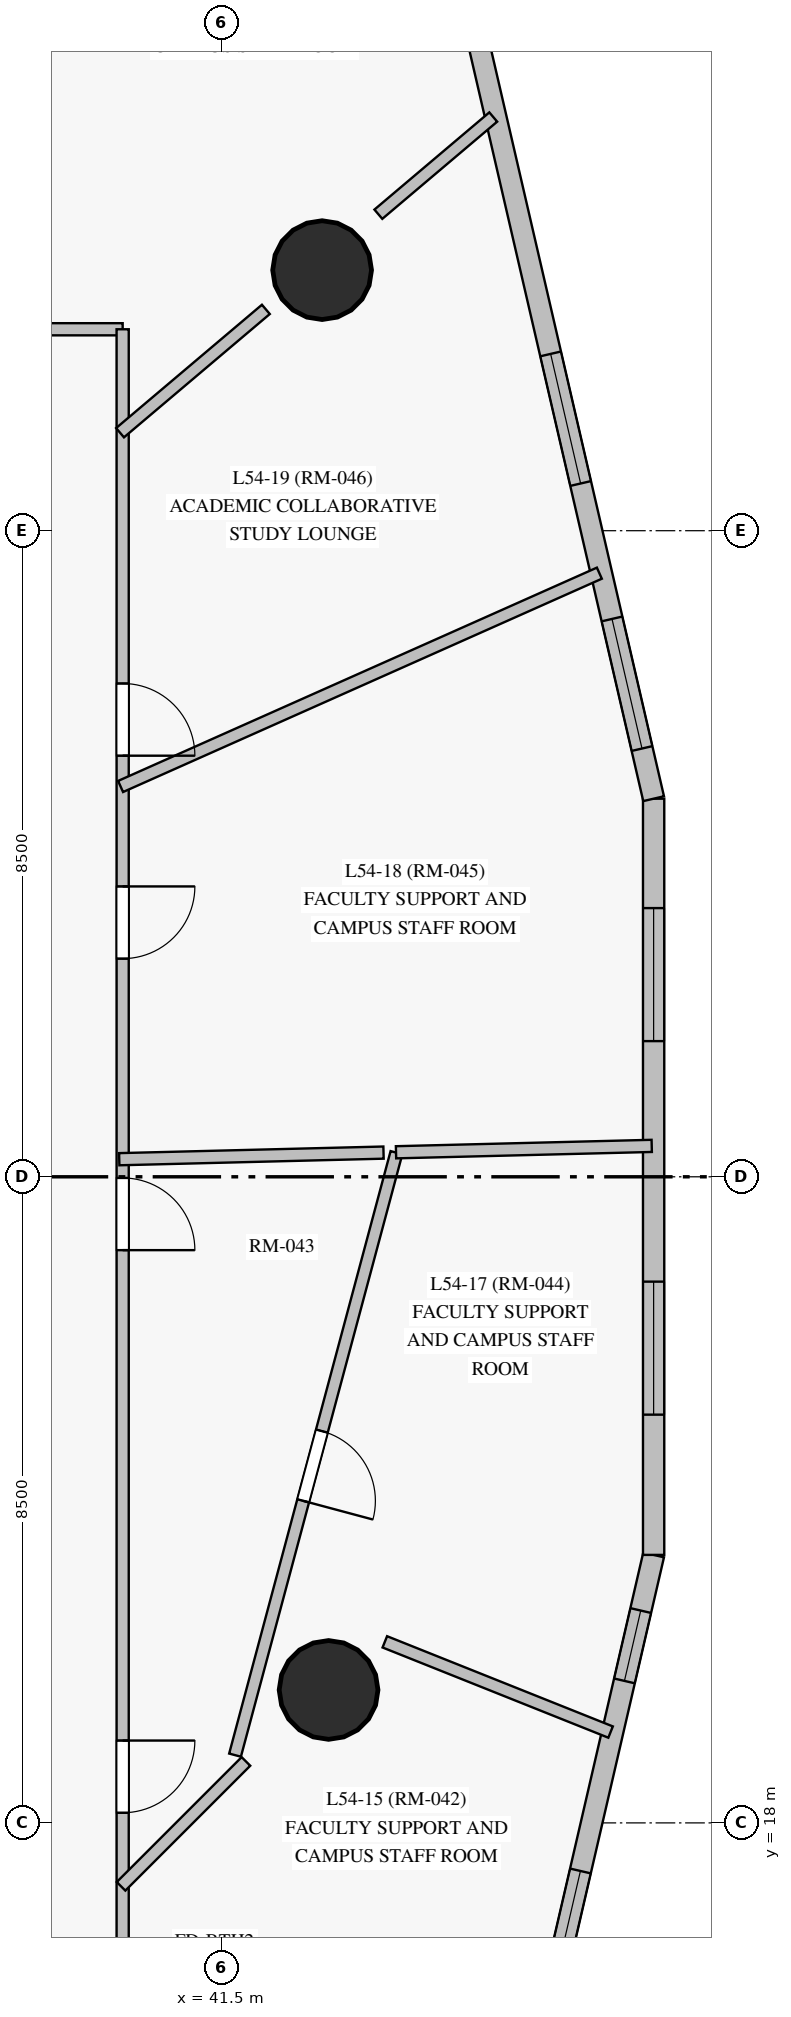
"""IFC4 building model, lengths in metres.
Left out: names, types, materials, properties, quantities, classifications, styles, units other than length and angle.
Written with IfcOpenShell. Run it as: python <this file> out.ifc"""

import sys

from ifc_helpers import new_model, si_unit, direction, frame, frame_2d, origin, origin_with_axes, origin_2d, place, context, subcontext, project, spatial, rectangle, circle, extrude, source, transform, mapped, element, fill, save


model = new_model("IFC4")
c1 = context("Model", 3, precision=1e-05, world=origin(), true_north=direction((0.0, 1.0)))
c2 = subcontext(c1, "Body", "Model", "MODEL_VIEW")
j1 = project(units=[si_unit("LENGTHUNIT", "METRE"), si_unit("PLANEANGLEUNIT", "RADIAN")], contexts=[c1])
p1 = place(None, origin())
s1 = spatial("IfcSite", under=j1, at=p1, CompositionType="ELEMENT")
p2 = place(p1, origin())
s2 = spatial("IfcBuilding", under=s1, at=p2, CompositionType="ELEMENT")
p3 = place(p2, frame((0.0, 0.0, 187.05)))
s3 = spatial("IfcBuildingStorey", under=s2, at=p3, CompositionType="ELEMENT", Elevation=187.05)
m1 = source(origin_with_axes(), c2, "Body", "SweptSolid", [
    extrude(circle(Radius=0.65, at=origin_2d()), origin(), (0.0, 0.0, 1.0), 3.05),
])
for number, where, z_axis, x_axis in (
    (1, (42.909, 19.749, 0.0), (0.0, 0.0, 1.0), (1.0, 0.0, 0.0)),
    (2, (42.824, 38.428, 0.0), (0.0, 0.0, 1.0), (1.0, 0.0, 0.0)),
):
    element("IfcColumn", number, at=place(p3, frame(where, z_axis=z_axis, x_axis=x_axis)), inside=s3, PredefinedType="COLUMN", context=c2, shape_type="MappedRepresentation", body=[
        mapped(m1, transform((0.0, 0.0, 0.0), scale=1.0)),
    ])
p4 = place(p3, frame((43.942, 7.521, 0.0), z_axis=(0.0, 0.0, 1.0), x_axis=(0.225598723883, 0.974220311727, 0.0)))
e3 = element("IfcWall", 3, at=p4, inside=s3, PredefinedType="SOLIDWALL", context=c2, shape_type="SweptSolid", body=[
    extrude(rectangle(XDim=14.375, YDim=0.28, at=frame_2d((7.188, 0.0))), origin(), (0.0, 0.0, 1.0), 2.825),
])
p5 = place(p4, frame((3.496, 0.0, 0.85)))
e4 = element("IfcOpeningElement", 4, at=p5, cuts=e3, PredefinedType="OPENING", context=c2, shape_type="SweptSolid", body=[
    extrude(rectangle(XDim=1.75, YDim=1.65, at=frame_2d((0.875, 0.825))), frame((0.0, 0.15, 0.0), z_axis=(0.0, -1.0, 0.0), x_axis=(1.0, 0.0, 0.0)), (0.0, 0.0, 1.0), 0.3),
])
p6 = place(p4, frame((8.356, 0.0, 0.85)))
e5 = element("IfcOpeningElement", 5, at=p6, cuts=e3, PredefinedType="OPENING", context=c2, shape_type="SweptSolid", body=[
    extrude(rectangle(XDim=1.75, YDim=1.65, at=frame_2d((0.875, 0.825))), frame((0.0, 0.15, 0.0), z_axis=(0.0, -1.0, 0.0), x_axis=(1.0, 0.0, 0.0)), (0.0, 0.0, 1.0), 0.3),
])
p7 = place(p4, frame((12.673, 0.0, 0.85)))
e6 = element("IfcOpeningElement", 6, at=p7, cuts=e3, PredefinedType="OPENING", context=c2, shape_type="SweptSolid", body=[
    extrude(rectangle(XDim=0.95, YDim=1.5, at=frame_2d((0.475, 0.75))), frame((0.0, 0.15, 0.0), z_axis=(0.0, -1.0, 0.0), x_axis=(1.0, 0.0, 0.0)), (0.0, 0.0, 1.0), 0.3),
])
p8 = place(p3, frame((47.185, 21.526, 0.0), z_axis=(0.0, 0.0, 1.0), x_axis=(0.0, 1.0, 0.0)))
e7 = element("IfcWall", 7, at=p8, inside=s3, PredefinedType="SOLIDWALL", context=c2, shape_type="SweptSolid", body=[
    extrude(rectangle(XDim=9.949, YDim=0.28, at=frame_2d((4.974, 0.0))), origin(), (0.0, 0.0, 1.0), 2.825),
])
p9 = place(p8, frame((1.845, 0.0, 0.85)))
e8 = element("IfcOpeningElement", 8, at=p9, cuts=e7, PredefinedType="OPENING", context=c2, shape_type="SweptSolid", body=[
    extrude(rectangle(XDim=1.75, YDim=1.65, at=frame_2d((0.875, 0.825))), frame((0.0, 0.15, 0.0), z_axis=(0.0, -1.0, 0.0), x_axis=(1.0, 0.0, 0.0)), (0.0, 0.0, 1.0), 0.3),
])
p10 = place(p8, frame((6.759, 0.0, 0.85)))
e9 = element("IfcOpeningElement", 9, at=p10, cuts=e7, PredefinedType="OPENING", context=c2, shape_type="SweptSolid", body=[
    extrude(rectangle(XDim=1.75, YDim=1.65, at=frame_2d((0.875, 0.825))), frame((0.0, 0.15, 0.0), z_axis=(0.0, -1.0, 0.0), x_axis=(1.0, 0.0, 0.0)), (0.0, 0.0, 1.0), 0.3),
])
p11 = place(p3, frame((47.185, 31.474, 0.0), z_axis=(0.0, 0.0, 1.0), x_axis=(-0.225598723883, 0.974220311727, 0.0)))
e10 = element("IfcWall", 10, at=p11, inside=s3, PredefinedType="SOLIDWALL", context=c2, shape_type="SweptSolid", body=[
    extrude(rectangle(XDim=14.375, YDim=0.28, at=frame_2d((7.188, 0.0))), origin(), (0.0, 0.0, 1.0), 2.825),
])
p12 = place(p11, frame((0.677, 0.0, 0.85)))
e11 = element("IfcOpeningElement", 11, at=p12, cuts=e10, PredefinedType="OPENING", context=c2, shape_type="SweptSolid", body=[
    extrude(rectangle(XDim=1.75, YDim=1.65, at=frame_2d((0.875, 0.825))), frame((0.0, 0.15, 0.0), z_axis=(0.0, -1.0, 0.0), x_axis=(1.0, 0.0, 0.0)), (0.0, 0.0, 1.0), 0.3),
])
p13 = place(p11, frame((4.256, 0.0, 0.85)))
e12 = element("IfcOpeningElement", 12, at=p13, cuts=e10, PredefinedType="OPENING", context=c2, shape_type="SweptSolid", body=[
    extrude(rectangle(XDim=1.75, YDim=1.65, at=frame_2d((0.875, 0.825))), frame((0.0, 0.15, 0.0), z_axis=(0.0, -1.0, 0.0), x_axis=(1.0, 0.0, 0.0)), (0.0, 0.0, 1.0), 0.3),
])
p14 = place(p11, frame((11.865, 0.0, 0.85)))
e13 = element("IfcOpeningElement", 13, at=p14, cuts=e10, PredefinedType="OPENING", context=c2, shape_type="SweptSolid", body=[
    extrude(rectangle(XDim=1.75, YDim=1.65, at=frame_2d((0.875, 0.825))), frame((0.0, 0.15, 0.0), z_axis=(0.0, -1.0, 0.0), x_axis=(1.0, 0.0, 0.0)), (0.0, 0.0, 1.0), 0.3),
])
p15 = place(p3, frame((16.7, 37.65, 0.0), z_axis=(0.0, 0.0, 1.0), x_axis=(1.0, 0.0, 0.0)))
e14 = element("IfcWall", 14, at=p15, inside=s3, PredefinedType="PARTITIONING", context=c2, shape_type="SweptSolid", body=[
    extrude(rectangle(XDim=23.5, YDim=0.16, at=frame_2d((11.75, 0.0))), origin(), (0.0, 0.0, 1.0), 2.375),
])
p16 = place(p15, frame((21.043, 0.0, 0.0)))
e15 = element("IfcOpeningElement", 15, at=p16, cuts=e14, PredefinedType="OPENING", context=c2, shape_type="SweptSolid", body=[
    extrude(rectangle(XDim=0.95, YDim=2.15, at=frame_2d((0.475, 1.075))), frame((0.0, 0.09, 0.0), z_axis=(0.0, -1.0, 0.0), x_axis=(1.0, 0.0, 0.0)), (0.0, 0.0, 1.0), 0.18),
])
p17 = place(p15, frame((17.79, 0.0, 0.0)))
e16 = element("IfcOpeningElement", 16, at=p17, cuts=e14, PredefinedType="OPENING", context=c2, shape_type="SweptSolid", body=[
    extrude(rectangle(XDim=0.95, YDim=2.15, at=frame_2d((0.475, 1.075))), frame((0.0, 0.09, 0.0), z_axis=(0.0, -1.0, 0.0), x_axis=(1.0, 0.0, 0.0)), (0.0, 0.0, 1.0), 0.18),
])
p18 = place(p15, frame((15.763, 0.0, 0.0)))
e17 = element("IfcOpeningElement", 17, at=p18, cuts=e14, PredefinedType="OPENING", context=c2, shape_type="SweptSolid", body=[
    extrude(rectangle(XDim=0.95, YDim=2.15, at=frame_2d((0.475, 1.075))), frame((0.0, 0.09, 0.0), z_axis=(0.0, -1.0, 0.0), x_axis=(1.0, 0.0, 0.0)), (0.0, 0.0, 1.0), 0.18),
])
p19 = place(p15, frame((13.003, 0.0, 0.0)))
e18 = element("IfcOpeningElement", 18, at=p19, cuts=e14, PredefinedType="OPENING", context=c2, shape_type="SweptSolid", body=[
    extrude(rectangle(XDim=0.95, YDim=2.15, at=frame_2d((0.475, 1.075))), frame((0.0, 0.09, 0.0), z_axis=(0.0, -1.0, 0.0), x_axis=(1.0, 0.0, 0.0)), (0.0, 0.0, 1.0), 0.18),
])
p20 = place(p15, frame((11.275, 0.0, 0.0)))
e19 = element("IfcOpeningElement", 19, at=p20, cuts=e14, PredefinedType="OPENING", context=c2, shape_type="SweptSolid", body=[
    extrude(rectangle(XDim=0.95, YDim=2.15, at=frame_2d((0.475, 1.075))), frame((0.0, 0.09, 0.0), z_axis=(0.0, -1.0, 0.0), x_axis=(1.0, 0.0, 0.0)), (0.0, 0.0, 1.0), 0.18),
])
p21 = place(p15, frame((7.75, 0.0, 0.0)))
e20 = element("IfcOpeningElement", 20, at=p21, cuts=e14, PredefinedType="OPENING", context=c2, shape_type="SweptSolid", body=[
    extrude(rectangle(XDim=0.95, YDim=2.15, at=frame_2d((0.475, 1.075))), frame((0.0, 0.09, 0.0), z_axis=(0.0, -1.0, 0.0), x_axis=(1.0, 0.0, 0.0)), (0.0, 0.0, 1.0), 0.18),
])
p22 = place(p15, frame((0.493, 0.0, 0.0)))
e21 = element("IfcOpeningElement", 21, at=p22, cuts=e14, PredefinedType="OPENING", context=c2, shape_type="SweptSolid", body=[
    extrude(rectangle(XDim=0.95, YDim=2.15, at=frame_2d((0.475, 1.075))), frame((0.0, 0.09, 0.0), z_axis=(0.0, -1.0, 0.0), x_axis=(1.0, 0.0, 0.0)), (0.0, 0.0, 1.0), 0.18),
])
p23 = place(p3, frame((40.2, 37.65, 0.0), z_axis=(0.0, 0.0, 1.0), x_axis=(0.0, -1.0, 0.0)))
e22 = element("IfcWall", 22, at=p23, inside=s3, PredefinedType="PARTITIONING", context=c2, shape_type="SweptSolid", body=[
    extrude(rectangle(XDim=22.3, YDim=0.16, at=frame_2d((11.15, 0.0))), origin(), (0.0, 0.0, 1.0), 2.375),
])
p24 = place(p23, frame((18.567, 0.0, 0.0)))
e23 = element("IfcOpeningElement", 23, at=p24, cuts=e22, PredefinedType="OPENING", context=c2, shape_type="SweptSolid", body=[
    extrude(rectangle(XDim=0.95, YDim=2.15, at=frame_2d((0.475, 1.075))), frame((0.0, 0.09, 0.0), z_axis=(0.0, -1.0, 0.0), x_axis=(1.0, 0.0, 0.0)), (0.0, 0.0, 1.0), 0.18),
])
p25 = place(p23, frame((11.165, 0.0, 0.0)))
e24 = element("IfcOpeningElement", 24, at=p25, cuts=e22, PredefinedType="OPENING", context=c2, shape_type="SweptSolid", body=[
    extrude(rectangle(XDim=0.95, YDim=2.15, at=frame_2d((0.475, 1.075))), frame((0.0, 0.09, 0.0), z_axis=(0.0, -1.0, 0.0), x_axis=(1.0, 0.0, 0.0)), (0.0, 0.0, 1.0), 0.18),
])
p26 = place(p23, frame((7.33, 0.0, 0.0)))
e25 = element("IfcOpeningElement", 25, at=p26, cuts=e22, PredefinedType="OPENING", context=c2, shape_type="SweptSolid", body=[
    extrude(rectangle(XDim=0.95, YDim=2.15, at=frame_2d((0.475, 1.075))), frame((0.0, 0.09, 0.0), z_axis=(0.0, -1.0, 0.0), x_axis=(1.0, 0.0, 0.0)), (0.0, 0.0, 1.0), 0.18),
])
p27 = place(p23, frame((4.66, 0.0, 0.0)))
e26 = element("IfcOpeningElement", 26, at=p27, cuts=e22, PredefinedType="OPENING", context=c2, shape_type="SweptSolid", body=[
    extrude(rectangle(XDim=0.95, YDim=2.15, at=frame_2d((0.475, 1.075))), frame((0.0, 0.09, 0.0), z_axis=(0.0, -1.0, 0.0), x_axis=(1.0, 0.0, 0.0)), (0.0, 0.0, 1.0), 0.18),
])
p28 = place(p3, frame((33.993, 37.61, 0.0), z_axis=(0.0, 0.0, 1.0), x_axis=(0.438887267055, 0.898542134135, 0.0)))
e27 = element("IfcWall", 27, at=p28, inside=s3, PredefinedType="PARTITIONING", context=c2, shape_type="SweptSolid", body=[
    extrude(rectangle(XDim=12.085, YDim=0.16, at=frame_2d((6.042, 0.0))), origin(), (0.0, 0.0, 1.0), 2.825),
])
p29 = place(p3, frame((36.085, 37.625, 0.0), z_axis=(0.0, 0.0, 1.0), x_axis=(0.559620939067, 0.828748698073, 0.0)))
e28 = element("IfcWall", 28, at=p29, inside=s3, PredefinedType="PARTITIONING", context=c2, shape_type="SweptSolid", body=[
    extrude(rectangle(XDim=10.844, YDim=0.16, at=frame_2d((5.422, 0.0))), origin(), (0.0, 0.0, 1.0), 2.825),
])
p30 = place(p3, frame((43.802, 26.817, 0.0), z_axis=(0.0, 0.0, 1.0), x_axis=(-0.25881986312, -0.965925607102, 0.0)))
e29 = element("IfcWall", 29, at=p30, inside=s3, PredefinedType="PARTITIONING", context=c2, shape_type="SweptSolid", body=[
    extrude(rectangle(XDim=8.206, YDim=0.16, at=frame_2d((4.103, 0.0))), origin(), (0.0, 0.0, 1.0), 2.275),
])
p31 = place(p30, frame((3.792, 0.0, 0.0)))
e30 = element("IfcOpeningElement", 30, at=p31, cuts=e29, PredefinedType="OPENING", context=c2, shape_type="SweptSolid", body=[
    extrude(rectangle(XDim=0.95, YDim=2.15, at=frame_2d((0.475, 1.075))), frame((0.0, 0.09, 0.0), z_axis=(0.0, -1.0, 0.0), x_axis=(1.0, 0.0, 0.0)), (0.0, 0.0, 1.0), 0.18),
])
p32 = place(p3, frame((40.173, 31.635, 0.0), z_axis=(0.0, 0.0, 1.0), x_axis=(0.913452030109, 0.406946419925, 0.0)))
e31 = element("IfcWall", 31, at=p32, inside=s3, PredefinedType="PARTITIONING", context=c2, shape_type="SweptSolid", body=[
    extrude(rectangle(XDim=6.896, YDim=0.16, at=frame_2d((3.448, 0.0))), origin(), (0.0, 0.0, 1.0), 2.825),
])
p33 = place(p3, frame((40.155, 26.731, 0.0), z_axis=(0.0, 0.0, 1.0), x_axis=(0.999687690253, 0.02499043731, 0.0)))
e32 = element("IfcWall", 32, at=p33, inside=s3, PredefinedType="PARTITIONING", context=c2, shape_type="SweptSolid", body=[
    extrude(rectangle(XDim=3.478, YDim=0.16, at=frame_2d((1.739, 0.0))), origin(), (0.0, 0.0, 1.0), 2.825),
])
p34 = place(p3, frame((43.796, 26.823, 0.0), z_axis=(0.0, 0.0, 1.0), x_axis=(0.999688506827, 0.02495775066, 0.0)))
e33 = element("IfcWall", 33, at=p34, inside=s3, PredefinedType="PARTITIONING", context=c2, shape_type="SweptSolid", body=[
    extrude(rectangle(XDim=3.365, YDim=0.16, at=frame_2d((1.683, 0.0))), origin(), (0.0, 0.0, 1.0), 2.825),
])
p35 = place(p3, frame((43.649, 20.382, 0.0), z_axis=(0.0, 0.0, 1.0), x_axis=(0.928618752778, -0.37103532445, 0.0)))
e34 = element("IfcWall", 34, at=p35, inside=s3, PredefinedType="PARTITIONING", context=c2, shape_type="SweptSolid", body=[
    extrude(rectangle(XDim=3.198, YDim=0.16, at=frame_2d((1.599, 0.0))), origin(), (0.0, 0.0, 1.0), 2.825),
])
p36 = place(p3, frame((40.166, 36.289, 0.0), z_axis=(0.0, 0.0, 1.0), x_axis=(0.763533690392, 0.645767995209, 0.0)))
e35 = element("IfcWall", 35, at=p36, inside=s3, PredefinedType="PARTITIONING", context=c2, shape_type="SweptSolid", body=[
    extrude(rectangle(XDim=2.513, YDim=0.16, at=frame_2d((1.256, 0.0))), origin(), (0.0, 0.0, 1.0), 2.275),
])
p37 = place(p3, frame((40.179, 17.166, 0.0), z_axis=(0.0, 0.0, 1.0), x_axis=(0.707159309269, 0.707054249202, 0.0)))
e36 = element("IfcWall", 36, at=p37, inside=s3, PredefinedType="PARTITIONING", context=c2, shape_type="SweptSolid", body=[
    extrude(rectangle(XDim=2.324, YDim=0.16, at=frame_2d((1.162, 0.0))), origin(), (0.0, 0.0, 1.0), 2.275),
])
p38 = place(p3, frame((43.564, 39.164, 0.0), z_axis=(0.0, 0.0, 1.0), x_axis=(0.76353126088, 0.645770867769, 0.0)))
e37 = element("IfcWall", 37, at=p38, inside=s3, PredefinedType="PARTITIONING", context=c2, shape_type="SweptSolid", body=[
    extrude(rectangle(XDim=1.98, YDim=0.16, at=frame_2d((0.99, 0.0))), origin(), (0.0, 0.0, 1.0), 2.495),
])
m2 = source(origin_with_axes(), c2, "Body", "SweptSolid", [
    extrude(rectangle(XDim=1.75, YDim=1.65, at=frame_2d((0.875, 0.825))), frame((0.0, 0.03, 0.0), z_axis=(0.0, -1.0, 0.0), x_axis=(1.0, 0.0, 0.0)), (0.0, 0.0, 1.0), 0.06),
])
p39 = place(p6, origin())
e38 = element("IfcWindow", 38, at=p39, inside=s3, PartitioningType="SINGLE_PANEL", PredefinedType="WINDOW", context=c2, shape_type="MappedRepresentation", body=[
    mapped(m2, transform((0.0, 0.0, 0.0), scale=1.0)),
])
fill(e5, e38)
m3 = source(origin_with_axes(), c2, "Body", "SweptSolid", [
    extrude(rectangle(XDim=0.95, YDim=1.5, at=frame_2d((0.475, 0.75))), frame((0.0, 0.03, 0.0), z_axis=(0.0, -1.0, 0.0), x_axis=(1.0, 0.0, 0.0)), (0.0, 0.0, 1.0), 0.06),
])
p40 = place(p7, origin())
e39 = element("IfcWindow", 39, at=p40, inside=s3, PartitioningType="SINGLE_PANEL", PredefinedType="WINDOW", context=c2, shape_type="MappedRepresentation", body=[
    mapped(m3, transform((0.0, 0.0, 0.0), scale=1.0)),
])
fill(e6, e39)
p41 = place(p9, origin())
e40 = element("IfcWindow", 40, at=p41, inside=s3, PartitioningType="SINGLE_PANEL", PredefinedType="WINDOW", context=c2, shape_type="MappedRepresentation", body=[
    mapped(m2, transform((0.0, 0.0, 0.0), scale=1.0)),
])
fill(e8, e40)
p42 = place(p10, origin())
e41 = element("IfcWindow", 41, at=p42, inside=s3, PartitioningType="SINGLE_PANEL", PredefinedType="WINDOW", context=c2, shape_type="MappedRepresentation", body=[
    mapped(m2, transform((0.0, 0.0, 0.0), scale=1.0)),
])
fill(e9, e41)
p43 = place(p12, origin())
e42 = element("IfcWindow", 42, at=p43, inside=s3, PartitioningType="SINGLE_PANEL", PredefinedType="WINDOW", context=c2, shape_type="MappedRepresentation", body=[
    mapped(m2, transform((0.0, 0.0, 0.0), scale=1.0)),
])
fill(e11, e42)
p44 = place(p13, origin())
e43 = element("IfcWindow", 43, at=p44, inside=s3, PartitioningType="SINGLE_PANEL", PredefinedType="WINDOW", context=c2, shape_type="MappedRepresentation", body=[
    mapped(m2, transform((0.0, 0.0, 0.0), scale=1.0)),
])
fill(e12, e43)
m4 = source(origin_with_axes(), c2, "Body", "SweptSolid", [
    extrude(rectangle(XDim=0.95, YDim=2.15, at=frame_2d((0.475, 1.075))), frame((0.0, 0.025, 0.0), z_axis=(0.0, -1.0, 0.0), x_axis=(1.0, 0.0, 0.0)), (0.0, 0.0, 1.0), 0.05),
])
p45 = place(p24, origin())
e44 = element("IfcDoor", 44, at=p45, inside=s3, OperationType="SINGLE_SWING_LEFT", PredefinedType="DOOR", context=c2, shape_type="MappedRepresentation", body=[
    mapped(m4, transform((0.0, 0.0, 0.0), scale=1.0)),
])
fill(e23, e44)
p46 = place(p25, origin())
e45 = element("IfcDoor", 45, at=p46, inside=s3, OperationType="SINGLE_SWING_RIGHT", PredefinedType="DOOR", context=c2, shape_type="MappedRepresentation", body=[
    mapped(m4, transform((0.0, 0.0, 0.0), scale=1.0)),
])
fill(e24, e45)
p47 = place(p26, origin())
e46 = element("IfcDoor", 46, at=p47, inside=s3, OperationType="SINGLE_SWING_LEFT", PredefinedType="DOOR", context=c2, shape_type="MappedRepresentation", body=[
    mapped(m4, transform((0.0, 0.0, 0.0), scale=1.0)),
])
fill(e25, e46)
p48 = place(p27, origin())
e47 = element("IfcDoor", 47, at=p48, inside=s3, OperationType="SINGLE_SWING_RIGHT", PredefinedType="DOOR", context=c2, shape_type="MappedRepresentation", body=[
    mapped(m4, transform((0.0, 0.0, 0.0), scale=1.0)),
])
fill(e26, e47)
p49 = place(p31, origin())
e48 = element("IfcDoor", 48, at=p49, inside=s3, OperationType="SINGLE_SWING_RIGHT", PredefinedType="DOOR", context=c2, shape_type="MappedRepresentation", body=[
    mapped(m4, transform((0.0, 0.0, 0.0), scale=1.0)),
])
fill(e30, e48)
save(model, sys.argv[1])
